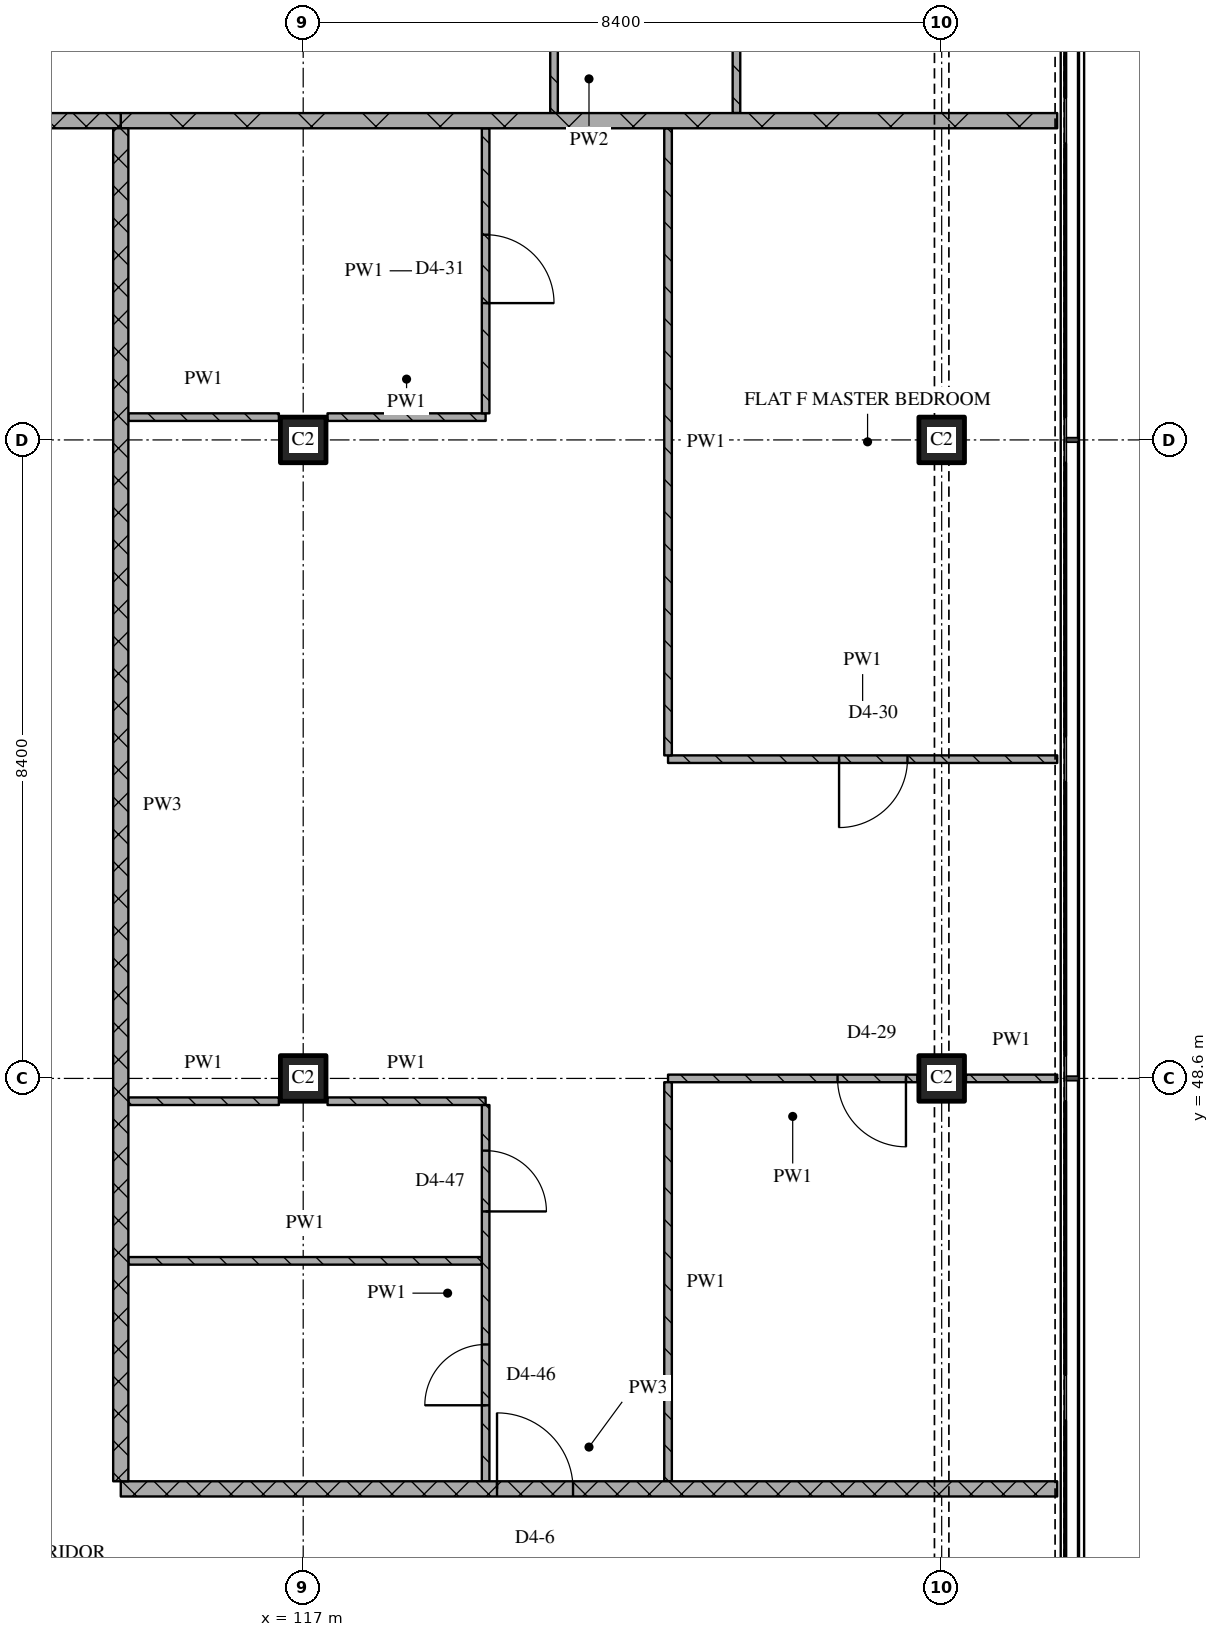
"""IFC4 building model, lengths in metres.
Left out: names, types, materials, properties, quantities, classifications, styles, units other than length and angle.
Written with IfcOpenShell. Run it as: python <this file> out.ifc"""

import sys

from ifc_helpers import new_model, si_unit, direction, frame, frame_2d, origin, origin_2d, place, context, subcontext, project, spatial, rectangle, extrude, element, fill, save


model = new_model("IFC4")
c1 = context("Model", 3, precision=1e-05, world=origin(), true_north=direction((0.0, 1.0)))
c2 = subcontext(c1, "Body", "Model", "MODEL_VIEW")
j1 = project(units=[si_unit("LENGTHUNIT", "METRE"), si_unit("PLANEANGLEUNIT", "RADIAN")], contexts=[c1])
p1 = place(None, origin())
s1 = spatial("IfcSite", under=j1, at=p1, CompositionType="ELEMENT")
p2 = place(p1, origin())
s2 = spatial("IfcBuilding", under=s1, at=p2, CompositionType="ELEMENT")
p3 = place(p2, frame((0.0, 0.0, 237.9)))
s3 = spatial("IfcBuildingStorey", under=s2, at=p3, CompositionType="ELEMENT", Elevation=237.9)
for number, where, z_axis, x_axis in (
    (1, (117.0, 48.6, 0.0), (0.0, 0.0, 1.0), (1.0, 0.0, 0.0)),
    (2, (117.0, 57.0, 0.0), (0.0, 0.0, 1.0), (1.0, 0.0, 0.0)),
    (3, (125.4, 48.6, 0.0), (0.0, 0.0, 1.0), (1.0, 0.0, 0.0)),
    (4, (125.4, 57.0, 0.0), (0.0, 0.0, 1.0), (1.0, 0.0, 0.0)),
):
    element("IfcColumn", number, at=place(p3, frame(where, z_axis=z_axis, x_axis=x_axis)), inside=s3, PredefinedType="COLUMN", context=c2, shape_type="SweptSolid", body=[
        extrude(rectangle(XDim=0.6, YDim=0.6, at=origin_2d()), origin(), (0.0, 0.0, 1.0), 3.6),
    ])
p4 = place(p3, frame((114.6, 43.2, 0.0), z_axis=(0.0, 0.0, 1.0), x_axis=(1.0, 0.0, 0.0)))
e5 = element("IfcWall", 5, at=p4, inside=s3, PredefinedType="PARTITIONING", context=c2, shape_type="SweptSolid", body=[
    extrude(rectangle(XDim=12.32, YDim=0.2, at=frame_2d((6.16, 0.0))), origin(), (0.0, 0.0, 1.0), 3.32),
])
p5 = place(p4, frame((4.95, 0.0, 0.0)))
e6 = element("IfcOpeningElement", 6, at=p5, cuts=e5, PredefinedType="OPENING", context=c2, shape_type="SweptSolid", body=[
    extrude(rectangle(XDim=1.0, YDim=2.1, at=frame_2d((0.5, 1.05))), frame((0.0, 0.11, 0.0), z_axis=(0.0, -1.0, 0.0), x_axis=(1.0, 0.0, 0.0)), (0.0, 0.0, 1.0), 0.22),
])
p6 = place(p3, frame((114.7, 46.2, 0.0), z_axis=(0.0, 0.0, 1.0), x_axis=(1.0, 0.0, 0.0)))
e7 = element("IfcWall", 7, at=p6, inside=s3, PredefinedType="PARTITIONING", context=c2, shape_type="SweptSolid", body=[
    extrude(rectangle(XDim=4.65, YDim=0.1, at=frame_2d((2.325, 0.0))), origin(), (0.0, 0.0, 1.0), 3.32),
])
p7 = place(p3, frame((114.7, 48.3, 0.0), z_axis=(0.0, 0.0, 1.0), x_axis=(1.0, 0.0, 0.0)))
e8 = element("IfcWall", 8, at=p7, inside=s3, PredefinedType="PARTITIONING", context=c2, shape_type="SweptSolid", body=[
    extrude(rectangle(XDim=1.98, YDim=0.1, at=frame_2d((0.99, 0.0))), origin(), (0.0, 0.0, 1.0), 3.32),
])
p8 = place(p3, frame((117.32, 48.3, 0.0), z_axis=(0.0, 0.0, 1.0), x_axis=(1.0, 0.0, 0.0)))
e9 = element("IfcWall", 9, at=p8, inside=s3, PredefinedType="PARTITIONING", context=c2, shape_type="SweptSolid", body=[
    extrude(rectangle(XDim=2.08, YDim=0.1, at=frame_2d((1.04, 0.0))), origin(), (0.0, 0.0, 1.0), 3.32),
])
p9 = place(p3, frame((125.08, 48.6, 0.0), z_axis=(0.0, 0.0, 1.0), x_axis=(-1.0, 0.0, 0.0)))
e10 = element("IfcWall", 10, at=p9, inside=s3, PredefinedType="PARTITIONING", context=c2, shape_type="SweptSolid", body=[
    extrude(rectangle(XDim=3.28, YDim=0.1, at=frame_2d((1.64, 0.0))), origin(), (0.0, 0.0, 1.0), 3.32),
])
p10 = place(p9, frame((0.15, 0.0, 0.0)))
e11 = element("IfcOpeningElement", 11, at=p10, cuts=e10, PredefinedType="OPENING", context=c2, shape_type="SweptSolid", body=[
    extrude(rectangle(XDim=0.9, YDim=2.1, at=frame_2d((0.45, 1.05))), frame((0.0, 0.06, 0.0), z_axis=(0.0, -1.0, 0.0), x_axis=(1.0, 0.0, 0.0)), (0.0, 0.0, 1.0), 0.12),
])
p11 = place(p3, frame((125.72, 48.6, 0.0), z_axis=(0.0, 0.0, 1.0), x_axis=(1.0, 0.0, 0.0)))
e12 = element("IfcWall", 12, at=p11, inside=s3, PredefinedType="PARTITIONING", context=c2, shape_type="SweptSolid", body=[
    extrude(rectangle(XDim=1.2, YDim=0.1, at=frame_2d((0.6, 0.0))), origin(), (0.0, 0.0, 1.0), 3.32),
])
p12 = place(p3, frame((121.8, 52.8, 0.0), z_axis=(0.0, 0.0, 1.0), x_axis=(1.0, 0.0, 0.0)))
e13 = element("IfcWall", 13, at=p12, inside=s3, PredefinedType="PARTITIONING", context=c2, shape_type="SweptSolid", body=[
    extrude(rectangle(XDim=5.12, YDim=0.1, at=frame_2d((2.56, 0.0))), origin(), (0.0, 0.0, 1.0), 3.32),
])
p13 = place(p12, frame((2.25, 0.0, 0.0)))
e14 = element("IfcOpeningElement", 14, at=p13, cuts=e13, PredefinedType="OPENING", context=c2, shape_type="SweptSolid", body=[
    extrude(rectangle(XDim=0.9, YDim=2.1, at=frame_2d((0.45, 1.05))), frame((0.0, 0.06, 0.0), z_axis=(0.0, -1.0, 0.0), x_axis=(1.0, 0.0, 0.0)), (0.0, 0.0, 1.0), 0.12),
])
p14 = place(p3, frame((114.7, 57.3, 0.0), z_axis=(0.0, 0.0, 1.0), x_axis=(1.0, 0.0, 0.0)))
e15 = element("IfcWall", 15, at=p14, inside=s3, PredefinedType="PARTITIONING", context=c2, shape_type="SweptSolid", body=[
    extrude(rectangle(XDim=1.98, YDim=0.1, at=frame_2d((0.99, 0.0))), origin(), (0.0, 0.0, 1.0), 3.32),
])
p15 = place(p3, frame((117.32, 57.3, 0.0), z_axis=(0.0, 0.0, 1.0), x_axis=(1.0, 0.0, 0.0)))
e16 = element("IfcWall", 16, at=p15, inside=s3, PredefinedType="PARTITIONING", context=c2, shape_type="SweptSolid", body=[
    extrude(rectangle(XDim=2.08, YDim=0.1, at=frame_2d((1.04, 0.0))), origin(), (0.0, 0.0, 1.0), 3.32),
])
p16 = place(p3, frame((111.0, 61.2, 0.0), z_axis=(0.0, 0.0, 1.0), x_axis=(1.0, 0.0, 0.0)))
e17 = element("IfcWall", 17, at=p16, inside=s3, PredefinedType="PARTITIONING", context=c2, shape_type="SweptSolid", body=[
    extrude(rectangle(XDim=3.6, YDim=0.2, at=frame_2d((1.8, 0.0))), origin(), (0.0, 0.0, 1.0), 3.32),
])
p17 = place(p3, frame((114.6, 61.2, 0.0), z_axis=(0.0, 0.0, 1.0), x_axis=(1.0, 0.0, 0.0)))
e18 = element("IfcWall", 18, at=p17, inside=s3, PredefinedType="PARTITIONING", context=c2, shape_type="SweptSolid", body=[
    extrude(rectangle(XDim=12.32, YDim=0.2, at=frame_2d((6.16, 0.0))), origin(), (0.0, 0.0, 1.0), 3.32),
])
p18 = place(p3, frame((114.6, 61.1, 0.0), z_axis=(0.0, 0.0, 1.0), x_axis=(0.0, -1.0, 0.0)))
e19 = element("IfcWall", 19, at=p18, inside=s3, PredefinedType="PARTITIONING", context=c2, shape_type="SweptSolid", body=[
    extrude(rectangle(XDim=17.8, YDim=0.2, at=frame_2d((8.9, 0.0))), origin(), (0.0, 0.0, 1.0), 3.32),
])
p19 = place(p3, frame((119.4, 43.3, 0.0), z_axis=(0.0, 0.0, 1.0), x_axis=(0.0, 1.0, 0.0)))
e20 = element("IfcWall", 20, at=p19, inside=s3, PredefinedType="PARTITIONING", context=c2, shape_type="SweptSolid", body=[
    extrude(rectangle(XDim=4.95, YDim=0.1, at=frame_2d((2.475, 0.0))), origin(), (0.0, 0.0, 1.0), 3.32),
])
p20 = place(p19, frame((1.0, 0.0, 0.0)))
e21 = element("IfcOpeningElement", 21, at=p20, cuts=e20, PredefinedType="OPENING", context=c2, shape_type="SweptSolid", body=[
    extrude(rectangle(XDim=0.8, YDim=2.1, at=frame_2d((0.4, 1.05))), frame((0.0, 0.06, 0.0), z_axis=(0.0, -1.0, 0.0), x_axis=(1.0, 0.0, 0.0)), (0.0, 0.0, 1.0), 0.12),
])
p21 = place(p19, frame((3.55, 0.0, 0.0)))
e22 = element("IfcOpeningElement", 22, at=p21, cuts=e20, PredefinedType="OPENING", context=c2, shape_type="SweptSolid", body=[
    extrude(rectangle(XDim=0.8, YDim=2.1, at=frame_2d((0.4, 1.05))), frame((0.0, 0.06, 0.0), z_axis=(0.0, -1.0, 0.0), x_axis=(1.0, 0.0, 0.0)), (0.0, 0.0, 1.0), 0.12),
])
p22 = place(p3, frame((119.4, 57.35, 0.0), z_axis=(0.0, 0.0, 1.0), x_axis=(0.0, 1.0, 0.0)))
e23 = element("IfcWall", 23, at=p22, inside=s3, PredefinedType="PARTITIONING", context=c2, shape_type="SweptSolid", body=[
    extrude(rectangle(XDim=3.75, YDim=0.1, at=frame_2d((1.875, 0.0))), origin(), (0.0, 0.0, 1.0), 3.32),
])
p23 = place(p22, frame((1.45, 0.0, 0.0)))
e24 = element("IfcOpeningElement", 24, at=p23, cuts=e23, PredefinedType="OPENING", context=c2, shape_type="SweptSolid", body=[
    extrude(rectangle(XDim=0.9, YDim=2.1, at=frame_2d((0.45, 1.05))), frame((0.0, 0.06, 0.0), z_axis=(0.0, -1.0, 0.0), x_axis=(1.0, 0.0, 0.0)), (0.0, 0.0, 1.0), 0.12),
])
p24 = place(p3, frame((120.3, 61.3, 0.0), z_axis=(0.0, 0.0, 1.0), x_axis=(0.0, 1.0, 0.0)))
e25 = element("IfcWall", 25, at=p24, inside=s3, PredefinedType="PARTITIONING", context=c2, shape_type="SweptSolid", body=[
    extrude(rectangle(XDim=4.65, YDim=0.1, at=frame_2d((2.325, 0.0))), origin(), (0.0, 0.0, 1.0), 3.32),
])
p25 = place(p24, frame((0.925, 0.0, 0.0)))
e26 = element("IfcOpeningElement", 26, at=p25, cuts=e25, PredefinedType="OPENING", context=c2, shape_type="SweptSolid", body=[
    extrude(rectangle(XDim=0.8, YDim=2.1, at=frame_2d((0.4, 1.05))), frame((0.0, 0.06, 0.0), z_axis=(0.0, -1.0, 0.0), x_axis=(1.0, 0.0, 0.0)), (0.0, 0.0, 1.0), 0.12),
])
p26 = place(p24, frame((3.275, 0.0, 0.0)))
e27 = element("IfcOpeningElement", 27, at=p26, cuts=e25, PredefinedType="OPENING", context=c2, shape_type="SweptSolid", body=[
    extrude(rectangle(XDim=0.9, YDim=2.1, at=frame_2d((0.45, 1.05))), frame((0.0, 0.06, 0.0), z_axis=(0.0, -1.0, 0.0), x_axis=(1.0, 0.0, 0.0)), (0.0, 0.0, 1.0), 0.12),
])
p27 = place(p3, frame((121.8, 48.55, 0.0), z_axis=(0.0, 0.0, 1.0), x_axis=(0.0, -1.0, 0.0)))
e28 = element("IfcWall", 28, at=p27, inside=s3, PredefinedType="PARTITIONING", context=c2, shape_type="SweptSolid", body=[
    extrude(rectangle(XDim=5.25, YDim=0.1, at=frame_2d((2.625, 0.0))), origin(), (0.0, 0.0, 1.0), 3.32),
])
for number, where, z_axis, x_axis in (
    (29, (121.8, 61.1, 0.0), (0.0, 0.0, 1.0), (0.0, -1.0, 0.0)),
    (30, (122.7, 69.55, 0.0), (0.0, 0.0, 1.0), (0.0, -1.0, 0.0)),
):
    element("IfcWall", number, at=place(p3, frame(where, z_axis=z_axis, x_axis=x_axis)), inside=s3, PredefinedType="PARTITIONING", context=c2, shape_type="SweptSolid", body=[
        extrude(rectangle(XDim=8.25, YDim=0.1, at=frame_2d((4.125, 0.0))), origin(), (0.0, 0.0, 1.0), 3.32),
    ])
p28 = place(p5, origin())
e31 = element("IfcDoor", 31, at=p28, inside=s3, OperationType="SINGLE_SWING_LEFT", PredefinedType="DOOR", context=c2, shape_type="SweptSolid", body=[
    extrude(rectangle(XDim=1.0, YDim=2.1, at=frame_2d((0.5, 1.05))), frame((0.0, 0.025, 0.0), z_axis=(0.0, -1.0, 0.0), x_axis=(1.0, 0.0, 0.0)), (0.0, 0.0, 1.0), 0.05),
])
fill(e6, e31)
p29 = place(p10, origin())
e32 = element("IfcDoor", 32, at=p29, inside=s3, OperationType="SINGLE_SWING_LEFT", PredefinedType="DOOR", context=c2, shape_type="SweptSolid", body=[
    extrude(rectangle(XDim=0.9, YDim=2.1, at=frame_2d((0.45, 1.05))), frame((0.0, 0.025, 0.0), z_axis=(0.0, -1.0, 0.0), x_axis=(1.0, 0.0, 0.0)), (0.0, 0.0, 1.0), 0.05),
])
fill(e11, e32)
p30 = place(p13, origin())
e33 = element("IfcDoor", 33, at=p30, inside=s3, OperationType="SINGLE_SWING_RIGHT", PredefinedType="DOOR", context=c2, shape_type="SweptSolid", body=[
    extrude(rectangle(XDim=0.9, YDim=2.1, at=frame_2d((0.45, 1.05))), frame((0.0, 0.025, 0.0), z_axis=(0.0, -1.0, 0.0), x_axis=(1.0, 0.0, 0.0)), (0.0, 0.0, 1.0), 0.05),
])
fill(e14, e33)
p31 = place(p20, origin())
e34 = element("IfcDoor", 34, at=p31, inside=s3, OperationType="SINGLE_SWING_LEFT", PredefinedType="DOOR", context=c2, shape_type="SweptSolid", body=[
    extrude(rectangle(XDim=0.8, YDim=2.1, at=frame_2d((0.4, 1.05))), frame((0.0, 0.025, 0.0), z_axis=(0.0, -1.0, 0.0), x_axis=(1.0, 0.0, 0.0)), (0.0, 0.0, 1.0), 0.05),
])
fill(e21, e34)
p32 = place(p21, origin())
e35 = element("IfcDoor", 35, at=p32, inside=s3, OperationType="SINGLE_SWING_RIGHT", PredefinedType="DOOR", context=c2, shape_type="SweptSolid", body=[
    extrude(rectangle(XDim=0.8, YDim=2.1, at=frame_2d((0.4, 1.05))), frame((0.0, 0.025, 0.0), z_axis=(0.0, -1.0, 0.0), x_axis=(1.0, 0.0, 0.0)), (0.0, 0.0, 1.0), 0.05),
])
fill(e22, e35)
p33 = place(p23, origin())
e36 = element("IfcDoor", 36, at=p33, inside=s3, OperationType="SINGLE_SWING_RIGHT", PredefinedType="DOOR", context=c2, shape_type="SweptSolid", body=[
    extrude(rectangle(XDim=0.9, YDim=2.1, at=frame_2d((0.45, 1.05))), frame((0.0, 0.025, 0.0), z_axis=(0.0, -1.0, 0.0), x_axis=(1.0, 0.0, 0.0)), (0.0, 0.0, 1.0), 0.05),
])
fill(e24, e36)
save(model, sys.argv[1])
